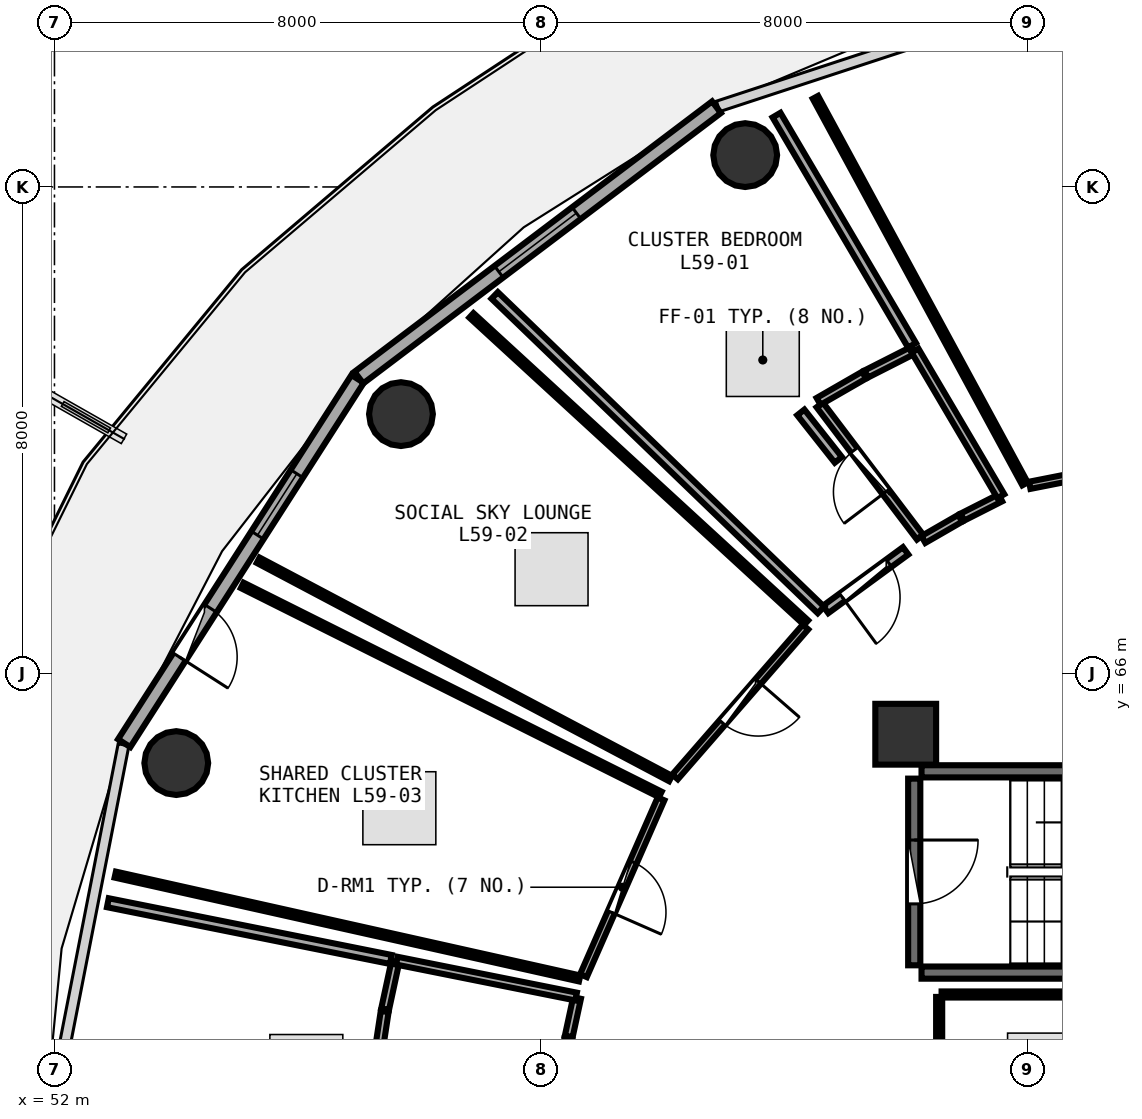
"""IFC4 building model, lengths in metres.
Left out: names, types, materials, properties, quantities, classifications, styles, units other than length and angle.
Written with IfcOpenShell. Run it as: python <this file> out.ifc"""

import sys

from ifc_helpers import new_model, si_unit, direction, frame, frame_2d, origin, origin_2d, place, context, subcontext, project, spatial, rectangle, circle, extrude, element, fill, save


model = new_model("IFC4")
c1 = context("Model", 3, precision=1e-05, world=origin(), true_north=direction((0.0, 1.0)))
c2 = subcontext(c1, "Body", "Model", "MODEL_VIEW")
j1 = project(units=[si_unit("LENGTHUNIT", "METRE"), si_unit("PLANEANGLEUNIT", "RADIAN")], contexts=[c1])
p1 = place(None, origin())
s1 = spatial("IfcSite", under=j1, at=p1, CompositionType="ELEMENT")
p2 = place(p1, origin())
s2 = spatial("IfcBuilding", under=s1, at=p2, CompositionType="ELEMENT")
p3 = place(p2, frame((0.0, 0.0, 230.7)))
s3 = spatial("IfcBuildingStorey", under=s2, at=p3, CompositionType="ELEMENT", Elevation=230.7)
p4 = place(p3, frame((66.0, 65.0, 0.0), z_axis=(0.0, 0.0, 1.0), x_axis=(1.0, 0.0, 0.0)))
e1 = element("IfcColumn", 1, at=p4, inside=s3, PredefinedType="PILASTER", context=c2, shape_type="SweptSolid", body=[
    extrude(rectangle(XDim=1.0, YDim=1.0, at=origin_2d()), origin(), (0.0, 0.0, 1.0), 3.75),
])
for number, where, z_axis, x_axis in (
    (2, (63.36, 74.524, 0.0), (0.0, 0.0, 1.0), (1.0, 0.0, 0.0)),
    (3, (57.698, 70.264, 0.0), (0.0, 0.0, 1.0), (1.0, 0.0, 0.0)),
    (4, (54.003, 64.526, 0.0), (0.0, 0.0, 1.0), (1.0, 0.0, 0.0)),
):
    element("IfcColumn", number, at=place(p3, frame(where, z_axis=z_axis, x_axis=x_axis)), inside=s3, PredefinedType="COLUMN", context=c2, shape_type="SweptSolid", body=[
        extrude(circle(Radius=0.525, at=origin_2d()), origin(), (0.0, 0.0, 1.0), 3.75),
    ])
p5 = place(p3, frame((62.888, 75.312, 0.0), z_axis=(0.0, 0.0, 1.0), x_axis=(-0.797701674595, -0.603052268338, 0.0)))
e5 = element("IfcWall", 5, at=p5, inside=s3, PredefinedType="SOLIDWALL", context=c2, shape_type="SweptSolid", body=[
    extrude(rectangle(XDim=7.374, YDim=0.24, at=frame_2d((3.687, 0.0))), origin(), (0.0, 0.0, 1.0), 3.475),
])
p6 = place(p5, frame((2.887, 0.0, 0.85)))
e6 = element("IfcOpeningElement", 6, at=p6, cuts=e5, PredefinedType="OPENING", context=c2, shape_type="SweptSolid", body=[
    extrude(rectangle(XDim=1.6, YDim=1.45, at=frame_2d((0.8, 0.725))), frame((0.0, 0.13, 0.0), z_axis=(0.0, -1.0, 0.0), x_axis=(1.0, 0.0, 0.0)), (0.0, 0.0, 1.0), 0.26),
])
p7 = place(p3, frame((56.986, 70.843, 0.0), z_axis=(0.0, 0.0, 1.0), x_axis=(-0.539539512973, -0.841960280501, 0.0)))
e7 = element("IfcWall", 7, at=p7, inside=s3, PredefinedType="SOLIDWALL", context=c2, shape_type="SweptSolid", body=[
    extrude(rectangle(XDim=7.115, YDim=0.24, at=frame_2d((3.557, 0.0))), origin(), (0.0, 0.0, 1.0), 3.475),
])
p8 = place(p7, frame((4.482, 0.0, 0.0)))
e8 = element("IfcOpeningElement", 8, at=p8, cuts=e7, PredefinedType="OPENING", context=c2, shape_type="SweptSolid", body=[
    extrude(rectangle(XDim=0.95, YDim=2.1, at=frame_2d((0.475, 1.05))), frame((0.0, 0.13, 0.0), z_axis=(0.0, -1.0, 0.0), x_axis=(1.0, 0.0, 0.0)), (0.0, 0.0, 1.0), 0.26),
])
p9 = place(p7, frame((1.852, 0.0, 0.85)))
e9 = element("IfcOpeningElement", 9, at=p9, cuts=e7, PredefinedType="OPENING", context=c2, shape_type="SweptSolid", body=[
    extrude(rectangle(XDim=1.2, YDim=1.45, at=frame_2d((0.6, 0.725))), frame((0.0, 0.13, 0.0), z_axis=(0.0, -1.0, 0.0), x_axis=(1.0, 0.0, 0.0)), (0.0, 0.0, 1.0), 0.26),
])
for number, where, z_axis, x_axis in (
    (10, (66.26, 61.08, 0.0), (0.0, 0.0, 1.0), (1.0, 0.0, 0.0)),
    (11, (73.42, 64.39, 0.0), (0.0, 0.0, 1.0), (-1.0, 0.0, 0.0)),
):
    element("IfcWall", number, at=place(p3, frame(where, z_axis=z_axis, x_axis=x_axis)), inside=s3, PredefinedType="SHEAR", context=c2, shape_type="SweptSolid", body=[
        extrude(rectangle(XDim=7.16, YDim=0.2, at=frame_2d((3.58, 0.0))), origin(), (0.0, 0.0, 1.0), 3.49),
    ])
p10 = place(p3, frame((66.14, 64.27, 0.0), z_axis=(0.0, 0.0, 1.0), x_axis=(0.0, -1.0, 0.0)))
e12 = element("IfcWall", 12, at=p10, inside=s3, PredefinedType="SHEAR", context=c2, shape_type="SweptSolid", body=[
    extrude(rectangle(XDim=3.07, YDim=0.2, at=frame_2d((1.535, 0.0))), origin(), (0.0, 0.0, 1.0), 3.49),
])
p11 = place(p10, frame((1.01, 0.0, 0.0)))
e13 = element("IfcOpeningElement", 13, at=p11, cuts=e12, PredefinedType="OPENING", context=c2, shape_type="SweptSolid", body=[
    extrude(rectangle(XDim=1.05, YDim=2.1, at=frame_2d((0.525, 1.05))), frame((0.0, 0.11, 0.0), z_axis=(0.0, -1.0, 0.0), x_axis=(1.0, 0.0, 0.0)), (0.0, 0.0, 1.0), 0.22),
])
p12 = place(p3, frame((74.241, 70.315, 0.0), z_axis=(0.0, 0.0, 1.0), x_axis=(-0.981135287424, -0.193322393353, 0.0)))
e14 = element("IfcWall", 14, at=p12, inside=s3, PredefinedType="PARTITIONING", context=c2, shape_type="SweptSolid", body=[
    extrude(rectangle(XDim=6.321, YDim=0.12, at=frame_2d((3.16, 0.0))), origin(), (0.0, 0.0, 1.0), 3.025),
])
p13 = place(p12, frame((2.71, 0.0, 0.0)))
e15 = element("IfcOpeningElement", 15, at=p13, cuts=e14, PredefinedType="OPENING", context=c2, shape_type="SweptSolid", body=[
    extrude(rectangle(XDim=0.9, YDim=2.08, at=frame_2d((0.45, 1.04))), frame((0.0, 0.07, 0.0), z_axis=(0.0, -1.0, 0.0), x_axis=(1.0, 0.0, 0.0)), (0.0, 0.0, 1.0), 0.14),
])
p14 = place(p3, frame((66.237, 68.24, 0.0), z_axis=(0.0, 0.0, 1.0), x_axis=(-0.604267149991, 0.79678178408, 0.0)))
e16 = element("IfcWall", 16, at=p14, inside=s3, PredefinedType="PLUMBINGWALL", context=c2, shape_type="SweptSolid", body=[
    extrude(rectangle(XDim=2.732, YDim=0.13, at=frame_2d((1.366, 0.0))), origin(), (0.0, 0.0, 1.0), 3.025),
])
p15 = place(p14, frame((0.936, 0.0, 0.0)))
e17 = element("IfcOpeningElement", 17, at=p15, cuts=e16, PredefinedType="OPENING", context=c2, shape_type="SweptSolid", body=[
    extrude(rectangle(XDim=0.86, YDim=2.05, at=frame_2d((0.43, 1.025))), frame((0.0, 0.075, 0.0), z_axis=(0.0, -1.0, 0.0), x_axis=(1.0, 0.0, 0.0)), (0.0, 0.0, 1.0), 0.15),
])
p16 = place(p3, frame((65.999, 68.015, 0.0), z_axis=(0.0, 0.0, 1.0), x_axis=(-0.806790207918, -0.59083801537, 0.0)))
e18 = element("IfcWall", 18, at=p16, inside=s3, PredefinedType="PARTITIONING", context=c2, shape_type="SweptSolid", body=[
    extrude(rectangle(XDim=1.631, YDim=0.15, at=frame_2d((0.816, 0.0))), origin(), (0.0, 0.0, 1.0), 3.025),
])
p17 = place(p16, frame((0.341, 0.0, 0.0)))
e19 = element("IfcOpeningElement", 19, at=p17, cuts=e18, PredefinedType="OPENING", context=c2, shape_type="SweptSolid", body=[
    extrude(rectangle(XDim=0.95, YDim=2.08, at=frame_2d((0.475, 1.04))), frame((0.0, 0.085, 0.0), z_axis=(0.0, -1.0, 0.0), x_axis=(1.0, 0.0, 0.0)), (0.0, 0.0, 1.0), 0.17),
])
p18 = place(p3, frame((64.352, 66.763, 0.0), z_axis=(0.0, 0.0, 1.0), x_axis=(-0.656587461417, -0.75424989593, 0.0)))
e20 = element("IfcWall", 20, at=p18, inside=s3, PredefinedType="PARTITIONING", context=c2, shape_type="SweptSolid", body=[
    extrude(rectangle(XDim=3.267, YDim=0.12, at=frame_2d((1.634, 0.0))), origin(), (0.0, 0.0, 1.0), 3.025),
])
p19 = place(p18, frame((1.184, 0.0, 0.0)))
e21 = element("IfcOpeningElement", 21, at=p19, cuts=e20, PredefinedType="OPENING", context=c2, shape_type="SweptSolid", body=[
    extrude(rectangle(XDim=0.9, YDim=2.08, at=frame_2d((0.45, 1.04))), frame((0.0, 0.07, 0.0), z_axis=(0.0, -1.0, 0.0), x_axis=(1.0, 0.0, 0.0)), (0.0, 0.0, 1.0), 0.14),
])
p20 = place(p3, frame((61.976, 63.937, 0.0), z_axis=(0.0, 0.0, 1.0), x_axis=(-0.401802923717, -0.91572616567, 0.0)))
e22 = element("IfcWall", 22, at=p20, inside=s3, PredefinedType="PARTITIONING", context=c2, shape_type="SweptSolid", body=[
    extrude(rectangle(XDim=3.175, YDim=0.12, at=frame_2d((1.587, 0.0))), origin(), (0.0, 0.0, 1.0), 3.235),
])
p21 = place(p20, frame((1.137, 0.0, 0.0)))
e23 = element("IfcOpeningElement", 23, at=p21, cuts=e22, PredefinedType="OPENING", context=c2, shape_type="SweptSolid", body=[
    extrude(rectangle(XDim=0.9, YDim=2.08, at=frame_2d((0.45, 1.04))), frame((0.0, 0.07, 0.0), z_axis=(0.0, -1.0, 0.0), x_axis=(1.0, 0.0, 0.0)), (0.0, 0.0, 1.0), 0.14),
])
p22 = place(p3, frame((69.96, 60.72, 0.0), z_axis=(0.0, 0.0, 1.0), x_axis=(-1.0, 0.0, 0.0)))
e24 = element("IfcWall", 24, at=p22, inside=s3, PredefinedType="PARTITIONING", context=c2, shape_type="SweptSolid", body=[
    extrude(rectangle(XDim=3.37, YDim=0.1, at=frame_2d((1.685, 0.0))), origin(), (0.0, 0.0, 1.0), 3.48),
])
p23 = place(p3, frame((66.55, 60.68, 0.0), z_axis=(0.0, 0.0, 1.0), x_axis=(0.0, -1.0, 0.0)))
e25 = element("IfcWall", 25, at=p23, inside=s3, PredefinedType="PARTITIONING", context=c2, shape_type="SweptSolid", body=[
    extrude(rectangle(XDim=2.39, YDim=0.1, at=frame_2d((1.195, 0.0))), origin(), (0.0, 0.0, 1.0), 3.48),
])
p24 = place(p3, frame((67.962, 69.117, 0.0), z_axis=(0.0, 0.0, 1.0), x_axis=(-0.476664873876, 0.879085091452, 0.0)))
e26 = element("IfcWall", 26, at=p24, inside=s3, PredefinedType="PARTITIONING", context=c2, shape_type="SweptSolid", body=[
    extrude(rectangle(XDim=7.231, YDim=0.1, at=frame_2d((3.615, 0.0))), origin(), (0.0, 0.0, 1.0), 3.075),
])
p25 = place(p3, frame((67.557, 68.888, 0.0), z_axis=(0.0, 0.0, 1.0), x_axis=(-0.891699149794, -0.452628574282, 0.0)))
e27 = element("IfcWall", 27, at=p25, inside=s3, PredefinedType="PLUMBINGWALL", context=c2, shape_type="SweptSolid", body=[
    extrude(rectangle(XDim=0.702, YDim=0.13, at=frame_2d((0.351, 0.0))), origin(), (0.0, 0.0, 1.0), 3.235),
])
p26 = place(p3, frame((66.896, 68.551, 0.0), z_axis=(0.0, 0.0, 1.0), x_axis=(-0.866301871779, -0.499520837356, 0.0)))
e28 = element("IfcWall", 28, at=p26, inside=s3, PredefinedType="PLUMBINGWALL", context=c2, shape_type="SweptSolid", body=[
    extrude(rectangle(XDim=0.699, YDim=0.13, at=frame_2d((0.35, 0.0))), origin(), (0.0, 0.0, 1.0), 3.48),
])
p27 = place(p3, frame((64.567, 70.474, 0.0), z_axis=(0.0, 0.0, 1.0), x_axis=(0.866585406338, 0.499028790273, 0.0)))
e29 = element("IfcWall", 29, at=p27, inside=s3, PredefinedType="PLUMBINGWALL", context=c2, shape_type="SweptSolid", body=[
    extrude(rectangle(XDim=0.864, YDim=0.13, at=frame_2d((0.432, 0.0))), origin(), (0.0, 0.0, 1.0), 3.025),
])
p28 = place(p3, frame((65.351, 70.924, 0.0), z_axis=(0.0, 0.0, 1.0), x_axis=(0.891825598475, 0.452379378293, 0.0)))
e30 = element("IfcWall", 30, at=p28, inside=s3, PredefinedType="PLUMBINGWALL", context=c2, shape_type="SweptSolid", body=[
    extrude(rectangle(XDim=0.868, YDim=0.13, at=frame_2d((0.434, 0.0))), origin(), (0.0, 0.0, 1.0), 3.175),
])
p29 = place(p3, frame((66.153, 71.309, 0.0), z_axis=(0.0, 0.0, 1.0), x_axis=(0.507776128274, -0.861489061773, 0.0)))
e31 = element("IfcWall", 31, at=p29, inside=s3, PredefinedType="PLUMBINGWALL", context=c2, shape_type="SweptSolid", body=[
    extrude(rectangle(XDim=2.78, YDim=0.13, at=frame_2d((1.39, 0.0))), origin(), (0.0, 0.0, 1.0), 3.175),
])
p30 = place(p3, frame((64.605, 67.044, 0.0), z_axis=(0.0, 0.0, 1.0), x_axis=(-0.719927885424, 0.694048874208, 0.0)))
e32 = element("IfcWall", 32, at=p30, inside=s3, PredefinedType="PARTITIONING", context=c2, shape_type="SweptSolid", body=[
    extrude(rectangle(XDim=7.453, YDim=0.15, at=frame_2d((3.727, 0.0))), origin(), (0.0, 0.0, 1.0), 3.075),
])
p31 = place(p3, frame((63.875, 75.181, 0.0), z_axis=(0.0, 0.0, 1.0), x_axis=(0.50737473807, -0.861725521943, 0.0)))
e33 = element("IfcWall", 33, at=p31, inside=s3, PredefinedType="PARTITIONING", context=c2, shape_type="SweptSolid", body=[
    extrude(rectangle(XDim=4.392, YDim=0.15, at=frame_2d((2.196, 0.0))), origin(), (0.0, 0.0, 1.0), 3.075),
])
p32 = place(p3, frame((64.275, 70.292, 0.0), z_axis=(0.0, 0.0, 1.0), x_axis=(0.620137292908, -0.784493300127, 0.0)))
e34 = element("IfcWall", 34, at=p32, inside=s3, PredefinedType="PARTITIONING", context=c2, shape_type="SweptSolid", body=[
    extrude(rectangle(XDim=0.995, YDim=0.15, at=frame_2d((0.498, 0.0))), origin(), (0.0, 0.0, 1.0), 3.025),
])
p33 = place(p3, frame((62.132, 64.272, 0.0), z_axis=(0.0, 0.0, 1.0), x_axis=(-0.883813456485, 0.467839474752, 0.0)))
e35 = element("IfcWall", 35, at=p33, inside=s3, PredefinedType="PARTITIONING", context=c2, shape_type="SweptSolid", body=[
    extrude(rectangle(XDim=7.673, YDim=0.1, at=frame_2d((3.836, 0.0))), origin(), (0.0, 0.0, 1.0), 3.025),
])
p34 = place(p3, frame((58.857, 71.888, 0.0), z_axis=(0.0, 0.0, 1.0), x_axis=(0.736669736632, -0.676252688815, 0.0)))
e36 = element("IfcWall", 36, at=p34, inside=s3, PredefinedType="PARTITIONING", context=c2, shape_type="SweptSolid", body=[
    extrude(rectangle(XDim=7.472, YDim=0.1, at=frame_2d((3.736, 0.0))), origin(), (0.0, 0.0, 1.0), 3.075),
])
p35 = place(p3, frame((60.637, 60.984, 0.0), z_axis=(0.0, 0.0, 1.0), x_axis=(-0.97589770928, 0.218228460612, 0.0)))
e37 = element("IfcWall", 37, at=p35, inside=s3, PredefinedType="PARTITIONING", context=c2, shape_type="SweptSolid", body=[
    extrude(rectangle(XDim=7.826, YDim=0.1, at=frame_2d((3.913, 0.0))), origin(), (0.0, 0.0, 1.0), 3.075),
])
p36 = place(p3, frame((55.088, 67.448, 0.0), z_axis=(0.0, 0.0, 1.0), x_axis=(0.894433542293, -0.447200892688, 0.0)))
e38 = element("IfcWall", 38, at=p36, inside=s3, PredefinedType="PARTITIONING", context=c2, shape_type="SweptSolid", body=[
    extrude(rectangle(XDim=7.688, YDim=0.1, at=frame_2d((3.844, 0.0))), origin(), (0.0, 0.0, 1.0), 3.025),
])
p37 = place(p3, frame((60.595, 60.663, 0.0), z_axis=(0.0, 0.0, 1.0), x_axis=(-0.211050082749, -0.977475249084, 0.0)))
e39 = element("IfcWall", 39, at=p37, inside=s3, PredefinedType="PLUMBINGWALL", context=c2, shape_type="SweptSolid", body=[
    extrude(rectangle(XDim=0.647, YDim=0.13, at=frame_2d((0.323, 0.0))), origin(), (0.0, 0.0, 1.0), 3.48),
])
p38 = place(p3, frame((60.451, 59.991, 0.0), z_axis=(0.0, 0.0, 1.0), x_axis=(-0.150321319766, -0.988637193729, 0.0)))
e40 = element("IfcWall", 40, at=p38, inside=s3, PredefinedType="PLUMBINGWALL", context=c2, shape_type="SweptSolid", body=[
    extrude(rectangle(XDim=0.645, YDim=0.13, at=frame_2d((0.322, 0.0))), origin(), (0.0, 0.0, 1.0), 3.48),
])
p39 = place(p3, frame((57.311, 59.652, 0.0), z_axis=(0.0, 0.0, 1.0), x_axis=(0.150331405734, 0.988635660114, 0.0)))
e41 = element("IfcWall", 41, at=p39, inside=s3, PredefinedType="PLUMBINGWALL", context=c2, shape_type="SweptSolid", body=[
    extrude(rectangle(XDim=0.797, YDim=0.13, at=frame_2d((0.399, 0.0))), origin(), (0.0, 0.0, 1.0), 3.48),
])
p40 = place(p3, frame((57.438, 60.479, 0.0), z_axis=(0.0, 0.0, 1.0), x_axis=(0.210843597485, 0.977519809211, 0.0)))
e42 = element("IfcWall", 42, at=p40, inside=s3, PredefinedType="PLUMBINGWALL", context=c2, shape_type="SweptSolid", body=[
    extrude(rectangle(XDim=0.799, YDim=0.13, at=frame_2d((0.399, 0.0))), origin(), (0.0, 0.0, 1.0), 3.48),
])
p41 = place(p3, frame((57.631, 61.276, 0.0), z_axis=(0.0, 0.0, 1.0), x_axis=(0.980543188147, -0.196303479793, 0.0)))
e43 = element("IfcWall", 43, at=p41, inside=s3, PredefinedType="PLUMBINGWALL", context=c2, shape_type="SweptSolid", body=[
    extrude(rectangle(XDim=3.007, YDim=0.13, at=frame_2d((1.504, 0.0))), origin(), (0.0, 0.0, 1.0), 3.175),
])
p42 = place(p3, frame((52.878, 62.229, 0.0), z_axis=(0.0, 0.0, 1.0), x_axis=(0.980491563171, -0.196561172538, 0.0)))
e44 = element("IfcWall", 44, at=p42, inside=s3, PredefinedType="PARTITIONING", context=c2, shape_type="SweptSolid", body=[
    extrude(rectangle(XDim=4.747, YDim=0.15, at=frame_2d((2.374, 0.0))), origin(), (0.0, 0.0, 1.0), 3.075),
])
p43 = place(p6, origin())
e45 = element("IfcWindow", 45, at=p43, inside=s3, PartitioningType="SINGLE_PANEL", PredefinedType="WINDOW", context=c2, shape_type="SweptSolid", body=[
    extrude(rectangle(XDim=1.6, YDim=1.45, at=frame_2d((0.8, 0.725))), frame((0.0, 0.03, 0.0), z_axis=(0.0, -1.0, 0.0), x_axis=(1.0, 0.0, 0.0)), (0.0, 0.0, 1.0), 0.06),
])
fill(e6, e45)
p44 = place(p8, frame((0.95, 0.0, 0.0), z_axis=(0.0, 0.0, 1.0), x_axis=(-1.0, 0.0, 0.0)))
e46 = element("IfcDoor", 46, at=p44, inside=s3, OperationType="SINGLE_SWING_LEFT", PredefinedType="DOOR", context=c2, shape_type="SweptSolid", body=[
    extrude(rectangle(XDim=0.95, YDim=2.1, at=frame_2d((0.475, 1.05))), frame((0.0, 0.025, 0.0), z_axis=(0.0, -1.0, 0.0), x_axis=(1.0, 0.0, 0.0)), (0.0, 0.0, 1.0), 0.05),
])
fill(e8, e46)
p45 = place(p9, origin())
e47 = element("IfcWindow", 47, at=p45, inside=s3, PartitioningType="SINGLE_PANEL", PredefinedType="WINDOW", context=c2, shape_type="SweptSolid", body=[
    extrude(rectangle(XDim=1.2, YDim=1.45, at=frame_2d((0.6, 0.725))), frame((0.0, 0.03, 0.0), z_axis=(0.0, -1.0, 0.0), x_axis=(1.0, 0.0, 0.0)), (0.0, 0.0, 1.0), 0.06),
])
fill(e9, e47)
p46 = place(p11, origin())
e48 = element("IfcDoor", 48, at=p46, inside=s3, OperationType="SINGLE_SWING_LEFT", PredefinedType="DOOR", context=c2, shape_type="SweptSolid", body=[
    extrude(rectangle(XDim=1.05, YDim=2.1, at=frame_2d((0.525, 1.05))), frame((0.0, 0.025, 0.0), z_axis=(0.0, -1.0, 0.0), x_axis=(1.0, 0.0, 0.0)), (0.0, 0.0, 1.0), 0.05),
])
fill(e13, e48)
p47 = place(p15, origin())
e49 = element("IfcDoor", 49, at=p47, inside=s3, OperationType="SINGLE_SWING_LEFT", PredefinedType="DOOR", context=c2, shape_type="SweptSolid", body=[
    extrude(rectangle(XDim=0.86, YDim=2.05, at=frame_2d((0.43, 1.025))), frame((0.0, 0.025, 0.0), z_axis=(0.0, -1.0, 0.0), x_axis=(1.0, 0.0, 0.0)), (0.0, 0.0, 1.0), 0.05),
])
fill(e17, e49)
p48 = place(p17, origin())
e50 = element("IfcDoor", 50, at=p48, inside=s3, OperationType="SINGLE_SWING_RIGHT", PredefinedType="DOOR", context=c2, shape_type="SweptSolid", body=[
    extrude(rectangle(XDim=0.95, YDim=2.08, at=frame_2d((0.475, 1.04))), frame((0.0, 0.025, 0.0), z_axis=(0.0, -1.0, 0.0), x_axis=(1.0, 0.0, 0.0)), (0.0, 0.0, 1.0), 0.05),
])
fill(e19, e50)
p49 = place(p19, origin())
e51 = element("IfcDoor", 51, at=p49, inside=s3, OperationType="SINGLE_SWING_LEFT", PredefinedType="DOOR", context=c2, shape_type="SweptSolid", body=[
    extrude(rectangle(XDim=0.9, YDim=2.08, at=frame_2d((0.45, 1.04))), frame((0.0, 0.025, 0.0), z_axis=(0.0, -1.0, 0.0), x_axis=(1.0, 0.0, 0.0)), (0.0, 0.0, 1.0), 0.05),
])
fill(e21, e51)
p50 = place(p21, origin())
e52 = element("IfcDoor", 52, at=p50, inside=s3, OperationType="SINGLE_SWING_RIGHT", PredefinedType="DOOR", context=c2, shape_type="SweptSolid", body=[
    extrude(rectangle(XDim=0.9, YDim=2.08, at=frame_2d((0.45, 1.04))), frame((0.0, 0.025, 0.0), z_axis=(0.0, -1.0, 0.0), x_axis=(1.0, 0.0, 0.0)), (0.0, 0.0, 1.0), 0.05),
])
fill(e23, e52)
save(model, sys.argv[1])
